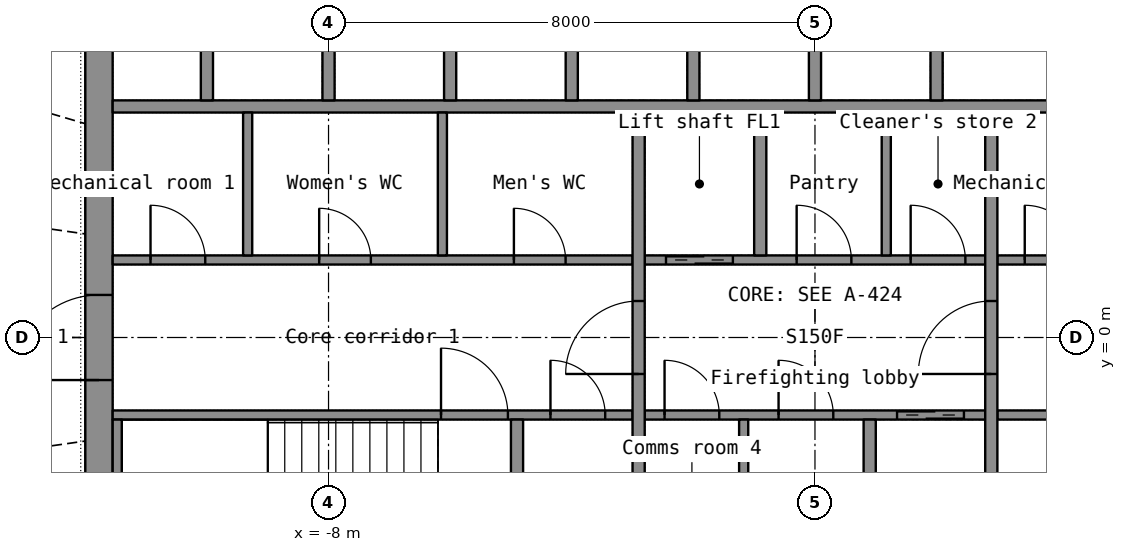
"""IFC4 building model, lengths in metres.
Left out: names, types, materials, properties, quantities, classifications, styles, units other than length and angle.
Written with IfcOpenShell. Run it as: python <this file> out.ifc"""

import sys

from ifc_helpers import new_model, si_unit, direction, frame, frame_2d, origin, place, context, subcontext, project, spatial, rectangle, extrude, element, fill, save


model = new_model("IFC4")
c1 = context("Model", 3, precision=1e-05, world=origin(), true_north=direction((0.0, 1.0)))
c2 = subcontext(c1, "Body", "Model", "MODEL_VIEW")
j1 = project(units=[si_unit("LENGTHUNIT", "METRE"), si_unit("PLANEANGLEUNIT", "RADIAN")], contexts=[c1])
p1 = place(None, origin())
s1 = spatial("IfcSite", under=j1, at=p1, CompositionType="ELEMENT")
p2 = place(p1, origin())
s2 = spatial("IfcBuilding", under=s1, at=p2, CompositionType="ELEMENT")
p3 = place(p2, frame((0.0, 0.0, 183.0)))
s3 = spatial("IfcBuildingStorey", under=s2, at=p3, CompositionType="ELEMENT", Elevation=183.0)
p4 = place(p3, frame((-11.775, -7.2, 0.0), z_axis=(0.0, 0.0, 1.0), x_axis=(0.0, 1.0, 0.0)))
e1 = element("IfcWall", 1, at=p4, inside=s3, PredefinedType="SHEAR", context=c2, shape_type="SweptSolid", body=[
    extrude(rectangle(XDim=14.4, YDim=0.45, at=frame_2d((7.2, 0.0))), origin(), (0.0, 0.0, 1.0), 3.3),
])
p5 = place(p4, frame((6.5, 0.0, 0.0)))
e2 = element("IfcOpeningElement", 2, at=p5, cuts=e1, PredefinedType="OPENING", context=c2, shape_type="SweptSolid", body=[
    extrude(rectangle(XDim=1.4, YDim=2.2, at=frame_2d((0.7, 1.1))), frame((0.0, 0.235, 0.0), z_axis=(0.0, -1.0, 0.0), x_axis=(1.0, 0.0, 0.0)), (0.0, 0.0, 1.0), 0.47),
])
p6 = place(p3, frame((-11.55, 3.8, 0.0), z_axis=(0.0, 0.0, 1.0), x_axis=(1.0, 0.0, 0.0)))
e3 = element("IfcWall", 3, at=p6, inside=s3, PredefinedType="SHEAR", context=c2, shape_type="SweptSolid", body=[
    extrude(rectangle(XDim=23.1, YDim=0.2, at=frame_2d((11.55, 0.0))), origin(), (0.0, 0.0, 1.0), 3.3),
])
for number, where, z_axis, x_axis in (
    (4, (-10.0, 3.9, 0.0), (0.0, 0.0, 1.0), (0.0, 1.0, 0.0)),
    (5, (-8.0, 3.9, 0.0), (0.0, 0.0, 1.0), (0.0, 1.0, 0.0)),
    (6, (-6.0, 3.9, 0.0), (0.0, 0.0, 1.0), (0.0, 1.0, 0.0)),
    (7, (-4.0, 3.9, 0.0), (0.0, 0.0, 1.0), (0.0, 1.0, 0.0)),
    (8, (-2.0, 3.9, 0.0), (0.0, 0.0, 1.0), (0.0, 1.0, 0.0)),
    (9, (0.0, 3.9, 0.0), (0.0, 0.0, 1.0), (0.0, 1.0, 0.0)),
    (10, (2.0, 3.9, 0.0), (0.0, 0.0, 1.0), (0.0, 1.0, 0.0)),
):
    element("IfcWall", number, at=place(p3, frame(where, z_axis=z_axis, x_axis=x_axis)), inside=s3, PredefinedType="SHEAR", context=c2, shape_type="SweptSolid", body=[
        extrude(rectangle(XDim=2.85, YDim=0.2, at=frame_2d((1.425, 0.0))), origin(), (0.0, 0.0, 1.0), 3.3),
    ])
p7 = place(p3, frame((-11.55, -1.275, 0.0), z_axis=(0.0, 0.0, 1.0), x_axis=(1.0, 0.0, 0.0)))
e11 = element("IfcWall", 11, at=p7, inside=s3, PredefinedType="SHEAR", context=c2, shape_type="SweptSolid", body=[
    extrude(rectangle(XDim=8.55, YDim=0.15, at=frame_2d((4.275, 0.0))), origin(), (0.0, 0.0, 1.0), 3.3),
])
p8 = place(p7, frame((5.4, 0.0, 0.0)))
e12 = element("IfcOpeningElement", 12, at=p8, cuts=e11, PredefinedType="OPENING", context=c2, shape_type="SweptSolid", body=[
    extrude(rectangle(XDim=1.1, YDim=2.15, at=frame_2d((0.55, 1.075))), frame((0.0, 0.085, 0.0), z_axis=(0.0, -1.0, 0.0), x_axis=(1.0, 0.0, 0.0)), (0.0, 0.0, 1.0), 0.17),
])
p9 = place(p7, frame((7.2, 0.0, 0.0)))
e13 = element("IfcOpeningElement", 13, at=p9, cuts=e11, PredefinedType="OPENING", context=c2, shape_type="SweptSolid", body=[
    extrude(rectangle(XDim=0.9, YDim=2.1, at=frame_2d((0.45, 1.05))), frame((0.0, 0.085, 0.0), z_axis=(0.0, -1.0, 0.0), x_axis=(1.0, 0.0, 0.0)), (0.0, 0.0, 1.0), 0.17),
])
p10 = place(p3, frame((-2.8, -1.275, 0.0), z_axis=(0.0, 0.0, 1.0), x_axis=(1.0, 0.0, 0.0)))
e14 = element("IfcWall", 14, at=p10, inside=s3, PredefinedType="SHEAR", context=c2, shape_type="SweptSolid", body=[
    extrude(rectangle(XDim=5.6, YDim=0.15, at=frame_2d((2.8, 0.0))), origin(), (0.0, 0.0, 1.0), 3.3),
])
p11 = place(p10, frame((4.15, 0.0, 0.0)))
e15 = element("IfcOpeningElement", 15, at=p11, cuts=e14, PredefinedType="OPENING", context=c2, shape_type="SweptSolid", body=[
    extrude(rectangle(XDim=1.1, YDim=2.2, at=frame_2d((0.55, 1.1))), frame((0.0, 0.085, 0.0), z_axis=(0.0, -1.0, 0.0), x_axis=(1.0, 0.0, 0.0)), (0.0, 0.0, 1.0), 0.17),
])
p12 = place(p10, frame((0.326, 0.0, 0.0)))
e16 = element("IfcOpeningElement", 16, at=p12, cuts=e14, PredefinedType="OPENING", context=c2, shape_type="SweptSolid", body=[
    extrude(rectangle(XDim=0.9, YDim=2.1, at=frame_2d((0.45, 1.05))), frame((0.0, 0.085, 0.0), z_axis=(0.0, -1.0, 0.0), x_axis=(1.0, 0.0, 0.0)), (0.0, 0.0, 1.0), 0.17),
])
p13 = place(p10, frame((2.201, 0.0, 0.0)))
e17 = element("IfcOpeningElement", 17, at=p13, cuts=e14, PredefinedType="OPENING", context=c2, shape_type="SweptSolid", body=[
    extrude(rectangle(XDim=0.9, YDim=2.1, at=frame_2d((0.45, 1.05))), frame((0.0, 0.085, 0.0), z_axis=(0.0, -1.0, 0.0), x_axis=(1.0, 0.0, 0.0)), (0.0, 0.0, 1.0), 0.17),
])
p14 = place(p3, frame((3.0, -1.275, 0.0), z_axis=(0.0, 0.0, 1.0), x_axis=(1.0, 0.0, 0.0)))
e18 = element("IfcWall", 18, at=p14, inside=s3, PredefinedType="PARTITIONING", context=c2, shape_type="SweptSolid", body=[
    extrude(rectangle(XDim=8.55, YDim=0.15, at=frame_2d((4.275, 0.0))), origin(), (0.0, 0.0, 1.0), 3.3),
])
p15 = place(p14, frame((0.978, 0.0, 0.0)))
e19 = element("IfcOpeningElement", 19, at=p15, cuts=e18, PredefinedType="OPENING", context=c2, shape_type="SweptSolid", body=[
    extrude(rectangle(XDim=0.85, YDim=2.1, at=frame_2d((0.425, 1.05))), frame((0.0, 0.085, 0.0), z_axis=(0.0, -1.0, 0.0), x_axis=(1.0, 0.0, 0.0)), (0.0, 0.0, 1.0), 0.17),
])
p16 = place(p14, frame((3.685, 0.0, 0.0)))
e20 = element("IfcOpeningElement", 20, at=p16, cuts=e18, PredefinedType="OPENING", context=c2, shape_type="SweptSolid", body=[
    extrude(rectangle(XDim=0.85, YDim=2.1, at=frame_2d((0.425, 1.05))), frame((0.0, 0.085, 0.0), z_axis=(0.0, -1.0, 0.0), x_axis=(1.0, 0.0, 0.0)), (0.0, 0.0, 1.0), 0.17),
])
p17 = place(p14, frame((6.532, 0.0, 0.0)))
e21 = element("IfcOpeningElement", 21, at=p17, cuts=e18, PredefinedType="OPENING", context=c2, shape_type="SweptSolid", body=[
    extrude(rectangle(XDim=0.9, YDim=2.1, at=frame_2d((0.45, 1.05))), frame((0.0, 0.085, 0.0), z_axis=(0.0, -1.0, 0.0), x_axis=(1.0, 0.0, 0.0)), (0.0, 0.0, 1.0), 0.17),
])
p18 = place(p3, frame((-11.55, 1.275, 0.0), z_axis=(0.0, 0.0, 1.0), x_axis=(1.0, 0.0, 0.0)))
e22 = element("IfcWall", 22, at=p18, inside=s3, PredefinedType="PARTITIONING", context=c2, shape_type="SweptSolid", body=[
    extrude(rectangle(XDim=8.55, YDim=0.15, at=frame_2d((4.275, 0.0))), origin(), (0.0, 0.0, 1.0), 3.3),
])
p19 = place(p18, frame((0.623, 0.0, 0.0)))
e23 = element("IfcOpeningElement", 23, at=p19, cuts=e22, PredefinedType="OPENING", context=c2, shape_type="SweptSolid", body=[
    extrude(rectangle(XDim=0.9, YDim=2.1, at=frame_2d((0.45, 1.05))), frame((0.0, 0.085, 0.0), z_axis=(0.0, -1.0, 0.0), x_axis=(1.0, 0.0, 0.0)), (0.0, 0.0, 1.0), 0.17),
])
p20 = place(p18, frame((3.396, 0.0, 0.0)))
e24 = element("IfcOpeningElement", 24, at=p20, cuts=e22, PredefinedType="OPENING", context=c2, shape_type="SweptSolid", body=[
    extrude(rectangle(XDim=0.85, YDim=2.1, at=frame_2d((0.425, 1.05))), frame((0.0, 0.085, 0.0), z_axis=(0.0, -1.0, 0.0), x_axis=(1.0, 0.0, 0.0)), (0.0, 0.0, 1.0), 0.17),
])
p21 = place(p18, frame((6.599, 0.0, 0.0)))
e25 = element("IfcOpeningElement", 25, at=p21, cuts=e22, PredefinedType="OPENING", context=c2, shape_type="SweptSolid", body=[
    extrude(rectangle(XDim=0.85, YDim=2.1, at=frame_2d((0.425, 1.05))), frame((0.0, 0.085, 0.0), z_axis=(0.0, -1.0, 0.0), x_axis=(1.0, 0.0, 0.0)), (0.0, 0.0, 1.0), 0.17),
])
p22 = place(p3, frame((-2.8, 1.275, 0.0), z_axis=(0.0, 0.0, 1.0), x_axis=(1.0, 0.0, 0.0)))
e26 = element("IfcWall", 26, at=p22, inside=s3, PredefinedType="SHEAR", context=c2, shape_type="SweptSolid", body=[
    extrude(rectangle(XDim=5.6, YDim=0.15, at=frame_2d((2.8, 0.0))), origin(), (0.0, 0.0, 1.0), 3.3),
])
p23 = place(p22, frame((0.35, 0.0, 0.0)))
e27 = element("IfcOpeningElement", 27, at=p23, cuts=e26, PredefinedType="OPENING", context=c2, shape_type="SweptSolid", body=[
    extrude(rectangle(XDim=1.1, YDim=2.2, at=frame_2d((0.55, 1.1))), frame((0.0, 0.085, 0.0), z_axis=(0.0, -1.0, 0.0), x_axis=(1.0, 0.0, 0.0)), (0.0, 0.0, 1.0), 0.17),
])
p24 = place(p22, frame((2.499, 0.0, 0.0)))
e28 = element("IfcOpeningElement", 28, at=p24, cuts=e26, PredefinedType="OPENING", context=c2, shape_type="SweptSolid", body=[
    extrude(rectangle(XDim=0.9, YDim=2.1, at=frame_2d((0.45, 1.05))), frame((0.0, 0.085, 0.0), z_axis=(0.0, -1.0, 0.0), x_axis=(1.0, 0.0, 0.0)), (0.0, 0.0, 1.0), 0.17),
])
p25 = place(p22, frame((4.374, 0.0, 0.0)))
e29 = element("IfcOpeningElement", 29, at=p25, cuts=e26, PredefinedType="OPENING", context=c2, shape_type="SweptSolid", body=[
    extrude(rectangle(XDim=0.9, YDim=2.1, at=frame_2d((0.45, 1.05))), frame((0.0, 0.085, 0.0), z_axis=(0.0, -1.0, 0.0), x_axis=(1.0, 0.0, 0.0)), (0.0, 0.0, 1.0), 0.17),
])
p26 = place(p3, frame((3.0, 1.275, 0.0), z_axis=(0.0, 0.0, 1.0), x_axis=(1.0, 0.0, 0.0)))
e30 = element("IfcWall", 30, at=p26, inside=s3, PredefinedType="SHEAR", context=c2, shape_type="SweptSolid", body=[
    extrude(rectangle(XDim=8.55, YDim=0.15, at=frame_2d((4.275, 0.0))), origin(), (0.0, 0.0, 1.0), 3.3),
])
p27 = place(p26, frame((2.05, 0.0, 0.0)))
e31 = element("IfcOpeningElement", 31, at=p27, cuts=e30, PredefinedType="OPENING", context=c2, shape_type="SweptSolid", body=[
    extrude(rectangle(XDim=1.1, YDim=2.15, at=frame_2d((0.55, 1.075))), frame((0.0, 0.085, 0.0), z_axis=(0.0, -1.0, 0.0), x_axis=(1.0, 0.0, 0.0)), (0.0, 0.0, 1.0), 0.17),
])
p28 = place(p26, frame((0.45, 0.0, 0.0)))
e32 = element("IfcOpeningElement", 32, at=p28, cuts=e30, PredefinedType="OPENING", context=c2, shape_type="SweptSolid", body=[
    extrude(rectangle(XDim=0.9, YDim=2.1, at=frame_2d((0.45, 1.05))), frame((0.0, 0.085, 0.0), z_axis=(0.0, -1.0, 0.0), x_axis=(1.0, 0.0, 0.0)), (0.0, 0.0, 1.0), 0.17),
])
p29 = place(p3, frame((-2.9, -3.7, 0.0), z_axis=(0.0, 0.0, 1.0), x_axis=(0.0, 1.0, 0.0)))
e33 = element("IfcWall", 33, at=p29, inside=s3, PredefinedType="SHEAR", context=c2, shape_type="SweptSolid", body=[
    extrude(rectangle(XDim=7.4, YDim=0.2, at=frame_2d((3.7, 0.0))), origin(), (0.0, 0.0, 1.0), 3.3),
])
p30 = place(p29, frame((3.1, 0.0, 0.0)))
e34 = element("IfcOpeningElement", 34, at=p30, cuts=e33, PredefinedType="OPENING", context=c2, shape_type="SweptSolid", body=[
    extrude(rectangle(XDim=1.2, YDim=2.2, at=frame_2d((0.6, 1.1))), frame((0.0, 0.11, 0.0), z_axis=(0.0, -1.0, 0.0), x_axis=(1.0, 0.0, 0.0)), (0.0, 0.0, 1.0), 0.22),
])
p31 = place(p3, frame((2.9, -3.7, 0.0), z_axis=(0.0, 0.0, 1.0), x_axis=(0.0, 1.0, 0.0)))
e35 = element("IfcWall", 35, at=p31, inside=s3, PredefinedType="SHEAR", context=c2, shape_type="SweptSolid", body=[
    extrude(rectangle(XDim=7.4, YDim=0.2, at=frame_2d((3.7, 0.0))), origin(), (0.0, 0.0, 1.0), 3.3),
])
p32 = place(p31, frame((3.1, 0.0, 0.0)))
e36 = element("IfcOpeningElement", 36, at=p32, cuts=e35, PredefinedType="OPENING", context=c2, shape_type="SweptSolid", body=[
    extrude(rectangle(XDim=1.2, YDim=2.2, at=frame_2d((0.6, 1.1))), frame((0.0, 0.11, 0.0), z_axis=(0.0, -1.0, 0.0), x_axis=(1.0, 0.0, 0.0)), (0.0, 0.0, 1.0), 0.22),
])
for number, where, z_axis, x_axis in (
    (37, (-0.9, 1.35, 0.0), (0.0, 0.0, 1.0), (0.0, 1.0, 0.0)),
    (38, (0.9, -3.7, 0.0), (0.0, 0.0, 1.0), (0.0, 1.0, 0.0)),
):
    element("IfcWall", number, at=place(p3, frame(where, z_axis=z_axis, x_axis=x_axis)), inside=s3, PredefinedType="SHEAR", context=c2, shape_type="SweptSolid", body=[
        extrude(rectangle(XDim=2.35, YDim=0.2, at=frame_2d((1.175, 0.0))), origin(), (0.0, 0.0, 1.0), 3.3),
    ])
p33 = place(p3, frame((-11.475, -3.7, 0.0), z_axis=(0.0, 0.0, 1.0), x_axis=(0.0, 1.0, 0.0)))
e39 = element("IfcWall", 39, at=p33, inside=s3, PredefinedType="SHEAR", context=c2, shape_type="SweptSolid", body=[
    extrude(rectangle(XDim=2.35, YDim=0.15, at=frame_2d((1.175, 0.0))), origin(), (0.0, 0.0, 1.0), 3.3),
])
p34 = place(p3, frame((-4.9, -3.7, 0.0), z_axis=(0.0, 0.0, 1.0), x_axis=(0.0, 1.0, 0.0)))
e40 = element("IfcWall", 40, at=p34, inside=s3, PredefinedType="SHEAR", context=c2, shape_type="SweptSolid", body=[
    extrude(rectangle(XDim=2.35, YDim=0.2, at=frame_2d((1.175, 0.0))), origin(), (0.0, 0.0, 1.0), 3.3),
])
for number, where, z_axis, x_axis in (
    (41, (-9.33, 1.35, 0.0), (0.0, 0.0, 1.0), (0.0, 1.0, 0.0)),
    (42, (-6.127, 1.35, 0.0), (0.0, 0.0, 1.0), (0.0, 1.0, 0.0)),
    (43, (1.173, 1.35, 0.0), (0.0, 0.0, 1.0), (0.0, 1.0, 0.0)),
    (44, (-1.173, -3.7, 0.0), (0.0, 0.0, 1.0), (0.0, 1.0, 0.0)),
):
    element("IfcWall", number, at=place(p3, frame(where, z_axis=z_axis, x_axis=x_axis)), inside=s3, PredefinedType="PARTITIONING", context=c2, shape_type="SweptSolid", body=[
        extrude(rectangle(XDim=2.35, YDim=0.15, at=frame_2d((1.175, 0.0))), origin(), (0.0, 0.0, 1.0), 3.3),
    ])
p35 = place(p5, origin())
e45 = element("IfcDoor", 45, at=p35, inside=s3, OperationType="DOUBLE_DOOR_SINGLE_SWING", PredefinedType="DOOR", context=c2, shape_type="SweptSolid", body=[
    extrude(rectangle(XDim=1.4, YDim=2.2, at=frame_2d((0.7, 1.1))), frame((0.0, 0.025, 0.0), z_axis=(0.0, -1.0, 0.0), x_axis=(1.0, 0.0, 0.0)), (0.0, 0.0, 1.0), 0.05),
])
fill(e2, e45)
p36 = place(p30, origin())
e46 = element("IfcDoor", 46, at=p36, inside=s3, OperationType="SINGLE_SWING_LEFT", PredefinedType="DOOR", context=c2, shape_type="SweptSolid", body=[
    extrude(rectangle(XDim=1.2, YDim=2.2, at=frame_2d((0.6, 1.1))), frame((0.0, 0.025, 0.0), z_axis=(0.0, -1.0, 0.0), x_axis=(1.0, 0.0, 0.0)), (0.0, 0.0, 1.0), 0.05),
])
fill(e34, e46)
p37 = place(p32, origin())
e47 = element("IfcDoor", 47, at=p37, inside=s3, OperationType="SINGLE_SWING_LEFT", PredefinedType="DOOR", context=c2, shape_type="SweptSolid", body=[
    extrude(rectangle(XDim=1.2, YDim=2.2, at=frame_2d((0.6, 1.1))), frame((0.0, 0.025, 0.0), z_axis=(0.0, -1.0, 0.0), x_axis=(1.0, 0.0, 0.0)), (0.0, 0.0, 1.0), 0.05),
])
fill(e36, e47)
p38 = place(p23, origin())
e48 = element("IfcDoor", 48, at=p38, inside=s3, OperationType="DOUBLE_DOOR_SLIDING", PredefinedType="DOOR", context=c2, shape_type="SweptSolid", body=[
    extrude(rectangle(XDim=1.1, YDim=2.2, at=frame_2d((0.55, 1.1))), frame((0.0, 0.025, 0.0), z_axis=(0.0, -1.0, 0.0), x_axis=(1.0, 0.0, 0.0)), (0.0, 0.0, 1.0), 0.05),
])
fill(e27, e48)
p39 = place(p11, origin())
e49 = element("IfcDoor", 49, at=p39, inside=s3, OperationType="DOUBLE_DOOR_SLIDING", PredefinedType="DOOR", context=c2, shape_type="SweptSolid", body=[
    extrude(rectangle(XDim=1.1, YDim=2.2, at=frame_2d((0.55, 1.1))), frame((0.0, 0.025, 0.0), z_axis=(0.0, -1.0, 0.0), x_axis=(1.0, 0.0, 0.0)), (0.0, 0.0, 1.0), 0.05),
])
fill(e15, e49)
p40 = place(p8, origin())
e50 = element("IfcDoor", 50, at=p40, inside=s3, OperationType="SINGLE_SWING_LEFT", PredefinedType="DOOR", context=c2, shape_type="SweptSolid", body=[
    extrude(rectangle(XDim=1.1, YDim=2.15, at=frame_2d((0.55, 1.075))), frame((0.0, 0.025, 0.0), z_axis=(0.0, -1.0, 0.0), x_axis=(1.0, 0.0, 0.0)), (0.0, 0.0, 1.0), 0.05),
])
fill(e12, e50)
p41 = place(p19, origin())
e51 = element("IfcDoor", 51, at=p41, inside=s3, OperationType="SINGLE_SWING_LEFT", PredefinedType="DOOR", context=c2, shape_type="SweptSolid", body=[
    extrude(rectangle(XDim=0.9, YDim=2.1, at=frame_2d((0.45, 1.05))), frame((0.0, 0.025, 0.0), z_axis=(0.0, -1.0, 0.0), x_axis=(1.0, 0.0, 0.0)), (0.0, 0.0, 1.0), 0.05),
])
fill(e23, e51)
p42 = place(p20, origin())
e52 = element("IfcDoor", 52, at=p42, inside=s3, OperationType="SINGLE_SWING_LEFT", PredefinedType="DOOR", context=c2, shape_type="SweptSolid", body=[
    extrude(rectangle(XDim=0.85, YDim=2.1, at=frame_2d((0.425, 1.05))), frame((0.0, 0.025, 0.0), z_axis=(0.0, -1.0, 0.0), x_axis=(1.0, 0.0, 0.0)), (0.0, 0.0, 1.0), 0.05),
])
fill(e24, e52)
p43 = place(p21, origin())
e53 = element("IfcDoor", 53, at=p43, inside=s3, OperationType="SINGLE_SWING_LEFT", PredefinedType="DOOR", context=c2, shape_type="SweptSolid", body=[
    extrude(rectangle(XDim=0.85, YDim=2.1, at=frame_2d((0.425, 1.05))), frame((0.0, 0.025, 0.0), z_axis=(0.0, -1.0, 0.0), x_axis=(1.0, 0.0, 0.0)), (0.0, 0.0, 1.0), 0.05),
])
fill(e25, e53)
p44 = place(p24, origin())
e54 = element("IfcDoor", 54, at=p44, inside=s3, OperationType="SINGLE_SWING_LEFT", PredefinedType="DOOR", context=c2, shape_type="SweptSolid", body=[
    extrude(rectangle(XDim=0.9, YDim=2.1, at=frame_2d((0.45, 1.05))), frame((0.0, 0.025, 0.0), z_axis=(0.0, -1.0, 0.0), x_axis=(1.0, 0.0, 0.0)), (0.0, 0.0, 1.0), 0.05),
])
fill(e28, e54)
p45 = place(p25, origin())
e55 = element("IfcDoor", 55, at=p45, inside=s3, OperationType="SINGLE_SWING_LEFT", PredefinedType="DOOR", context=c2, shape_type="SweptSolid", body=[
    extrude(rectangle(XDim=0.9, YDim=2.1, at=frame_2d((0.45, 1.05))), frame((0.0, 0.025, 0.0), z_axis=(0.0, -1.0, 0.0), x_axis=(1.0, 0.0, 0.0)), (0.0, 0.0, 1.0), 0.05),
])
fill(e29, e55)
p46 = place(p12, origin())
e56 = element("IfcDoor", 56, at=p46, inside=s3, OperationType="SINGLE_SWING_LEFT", PredefinedType="DOOR", context=c2, shape_type="SweptSolid", body=[
    extrude(rectangle(XDim=0.9, YDim=2.1, at=frame_2d((0.45, 1.05))), frame((0.0, 0.025, 0.0), z_axis=(0.0, -1.0, 0.0), x_axis=(1.0, 0.0, 0.0)), (0.0, 0.0, 1.0), 0.05),
])
fill(e16, e56)
p47 = place(p13, origin())
e57 = element("IfcDoor", 57, at=p47, inside=s3, OperationType="SINGLE_SWING_LEFT", PredefinedType="DOOR", context=c2, shape_type="SweptSolid", body=[
    extrude(rectangle(XDim=0.9, YDim=2.1, at=frame_2d((0.45, 1.05))), frame((0.0, 0.025, 0.0), z_axis=(0.0, -1.0, 0.0), x_axis=(1.0, 0.0, 0.0)), (0.0, 0.0, 1.0), 0.05),
])
fill(e17, e57)
p48 = place(p28, origin())
e58 = element("IfcDoor", 58, at=p48, inside=s3, OperationType="SINGLE_SWING_LEFT", PredefinedType="DOOR", context=c2, shape_type="SweptSolid", body=[
    extrude(rectangle(XDim=0.9, YDim=2.1, at=frame_2d((0.45, 1.05))), frame((0.0, 0.025, 0.0), z_axis=(0.0, -1.0, 0.0), x_axis=(1.0, 0.0, 0.0)), (0.0, 0.0, 1.0), 0.05),
])
fill(e32, e58)
p49 = place(p9, origin())
e59 = element("IfcDoor", 59, at=p49, inside=s3, OperationType="SINGLE_SWING_LEFT", PredefinedType="DOOR", context=c2, shape_type="SweptSolid", body=[
    extrude(rectangle(XDim=0.9, YDim=2.1, at=frame_2d((0.45, 1.05))), frame((0.0, 0.025, 0.0), z_axis=(0.0, -1.0, 0.0), x_axis=(1.0, 0.0, 0.0)), (0.0, 0.0, 1.0), 0.05),
])
fill(e13, e59)
save(model, sys.argv[1])
